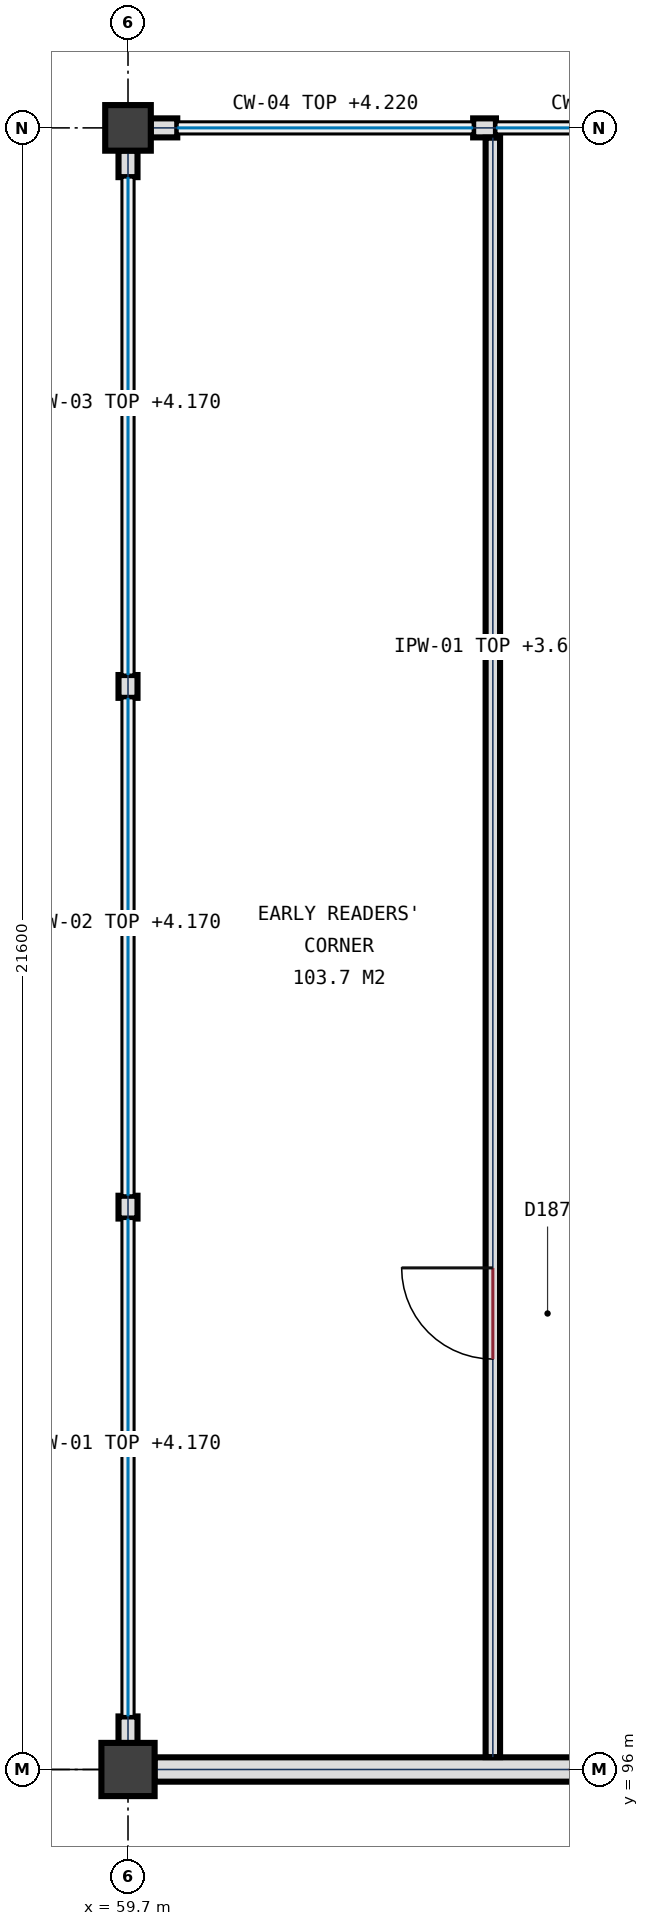
"""IFC4 building model, lengths in metres.
Left out: names, types, materials, properties, quantities, classifications, styles, units other than length and angle.
Written with IfcOpenShell. Run it as: python <this file> out.ifc"""

import sys

from ifc_helpers import new_model, si_unit, direction, frame, frame_2d, origin, origin_2d, place, context, subcontext, project, spatial, rectangle, circle, extrude, element, fill, save


model = new_model("IFC4")
c1 = context("Model", 3, precision=1e-05, world=origin(), true_north=direction((0.0, 1.0)))
c2 = subcontext(c1, "Body", "Model", "MODEL_VIEW")
j1 = project(units=[si_unit("LENGTHUNIT", "METRE"), si_unit("PLANEANGLEUNIT", "RADIAN")], contexts=[c1])
p1 = place(None, origin())
s1 = spatial("IfcSite", under=j1, at=p1, CompositionType="ELEMENT")
p2 = place(p1, origin())
s2 = spatial("IfcBuilding", under=s1, at=p2, CompositionType="ELEMENT")
p3 = place(p2, origin())
s3 = spatial("IfcBuildingStorey", under=s2, at=p3, CompositionType="ELEMENT", Elevation=0.0)
p4 = place(p3, frame((59.7, 96.0, 0.0), z_axis=(0.0, 0.0, 1.0), x_axis=(1.0, 0.0, 0.0)))
e1 = element("IfcColumn", 1, at=p4, inside=s3, PredefinedType="COLUMN", context=c2, shape_type="SweptSolid", body=[
    extrude(circle(Radius=0.35, at=origin_2d()), origin(), (0.0, 0.0, 1.0), 5.4),
])
p5 = place(p3, frame((59.7, 117.6, 0.0), z_axis=(0.0, 0.0, 1.0), x_axis=(1.0, 0.0, 0.0)))
e2 = element("IfcColumn", 2, at=p5, inside=s3, PredefinedType="COLUMN", context=c2, shape_type="SweptSolid", body=[
    extrude(circle(Radius=0.3, at=origin_2d()), origin(), (0.0, 0.0, 1.0), 5.4),
])
p6 = place(p3, frame((72.952, 96.0, 0.0), z_axis=(0.0, 0.0, 1.0), x_axis=(-1.0, 0.0, 0.0)))
e3 = element("IfcWall", 3, at=p6, inside=s3, PredefinedType="SOLIDWALL", context=c2, shape_type="SweptSolid", body=[
    extrude(rectangle(XDim=12.904, YDim=0.32, at=frame_2d((6.452, 0.0))), origin(), (0.0, 0.0, 1.0), 4.17),
])
p7 = place(p6, frame((5.452, 0.0, 0.0)))
e4 = element("IfcOpeningElement", 4, at=p7, cuts=e3, PredefinedType="OPENING", context=c2, shape_type="SweptSolid", body=[
    extrude(rectangle(XDim=2.0, YDim=2.35, at=frame_2d((1.0, 1.175))), frame((0.0, 0.17, 0.0), z_axis=(0.0, -1.0, 0.0), x_axis=(1.0, 0.0, 0.0)), (0.0, 0.0, 1.0), 0.34),
])
for number, where, z_axis, x_axis in (
    (5, (59.7, 96.348, 0.0), (0.0, 0.0, 1.0), (0.0, 1.0, 0.0)),
    (6, (59.7, 116.952, 0.0), (0.0, 0.0, 1.0), (0.0, 1.0, 0.0)),
):
    element("IfcWall", number, at=place(p3, frame(where, z_axis=z_axis, x_axis=x_axis)), inside=s3, PredefinedType="SOLIDWALL", context=c2, shape_type="SweptSolid", body=[
        extrude(rectangle(XDim=0.35, YDim=0.25, at=frame_2d((0.175, 0.0))), origin(), (0.0, 0.0, 1.0), 4.17),
    ])
for number, where, z_axis, x_axis in (
    (7, (59.7, 103.249, 0.0), (0.0, 0.0, 1.0), (0.0, 1.0, 0.0)),
    (8, (59.7, 110.101, 0.0), (0.0, 0.0, 1.0), (0.0, 1.0, 0.0)),
):
    element("IfcWall", number, at=place(p3, frame(where, z_axis=z_axis, x_axis=x_axis)), inside=s3, PredefinedType="SOLIDWALL", context=c2, shape_type="SweptSolid", body=[
        extrude(rectangle(XDim=0.3, YDim=0.25, at=frame_2d((0.15, 0.0))), origin(), (0.0, 0.0, 1.0), 4.17),
    ])
p8 = place(p3, frame((59.998, 117.6, 0.0), z_axis=(0.0, 0.0, 1.0), x_axis=(1.0, 0.0, 0.0)))
e9 = element("IfcWall", 9, at=p8, inside=s3, PredefinedType="SOLIDWALL", context=c2, shape_type="SweptSolid", body=[
    extrude(rectangle(XDim=0.35, YDim=0.25, at=frame_2d((0.175, 0.0))), origin(), (0.0, 0.0, 1.0), 4.22),
])
p9 = place(p3, frame((64.241, 117.6, 0.0), z_axis=(0.0, 0.0, 1.0), x_axis=(1.0, 0.0, 0.0)))
e10 = element("IfcWall", 10, at=p9, inside=s3, PredefinedType="SOLIDWALL", context=c2, shape_type="SweptSolid", body=[
    extrude(rectangle(XDim=0.3, YDim=0.25, at=frame_2d((0.15, 0.0))), origin(), (0.0, 0.0, 1.0), 4.22),
])
p10 = place(p3, frame((64.5, 96.163, 0.0), z_axis=(0.0, 0.0, 1.0), x_axis=(0.0, 1.0, 0.0)))
e11 = element("IfcWall", 11, at=p10, inside=s3, PredefinedType="PARTITIONING", context=c2, shape_type="SweptSolid", body=[
    extrude(rectangle(XDim=21.308, YDim=0.19, at=frame_2d((10.654, 0.0))), origin(), (0.0, 0.0, 1.0), 3.61),
])
p11 = place(p10, frame((5.237, 0.0, 0.0)))
e12 = element("IfcOpeningElement", 12, at=p11, cuts=e11, PredefinedType="OPENING", context=c2, shape_type="SweptSolid", body=[
    extrude(rectangle(XDim=1.2, YDim=2.2, at=frame_2d((0.6, 1.1))), frame((0.0, 0.105, 0.0), z_axis=(0.0, -1.0, 0.0), x_axis=(1.0, 0.0, 0.0)), (0.0, 0.0, 1.0), 0.21),
])
p12 = place(p11, origin())
e13 = element("IfcDoor", 13, at=p12, inside=s3, OperationType="SINGLE_SWING_RIGHT", PredefinedType="DOOR", context=c2, shape_type="SweptSolid", body=[
    extrude(rectangle(XDim=1.2, YDim=2.2, at=frame_2d((0.6, 1.1))), frame((0.0, 0.032, 0.0), z_axis=(0.0, -1.0, 0.0), x_axis=(1.0, 0.0, 0.0)), (0.0, 0.0, 1.0), 0.065),
])
fill(e12, e13)
save(model, sys.argv[1])
